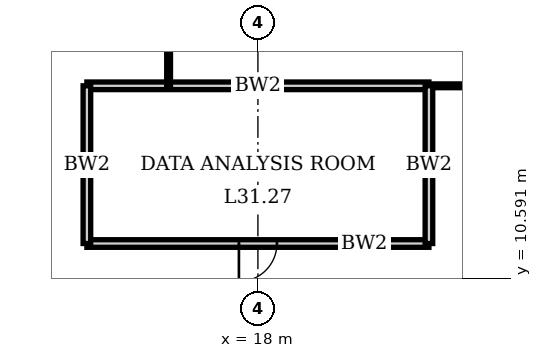
"""IFC4 building model, lengths in metres.
Left out: names, types, materials, properties, quantities, classifications, styles, units other than length and angle.
Written with IfcOpenShell. Run it as: python <this file> out.ifc"""

import sys

from ifc_helpers import new_model, si_unit, direction, frame, frame_2d, origin, place, context, subcontext, project, spatial, rectangle, extrude, element, fill, save


model = new_model("IFC4")
c1 = context("Model", 3, precision=1e-05, world=origin(), true_north=direction((0.0, 1.0)))
c2 = subcontext(c1, "Body", "Model", "MODEL_VIEW")
j1 = project(units=[si_unit("LENGTHUNIT", "METRE"), si_unit("PLANEANGLEUNIT", "RADIAN")], contexts=[c1])
p1 = place(None, origin())
s1 = spatial("IfcSite", under=j1, at=p1, CompositionType="ELEMENT")
p2 = place(p1, origin())
s2 = spatial("IfcBuilding", under=s1, at=p2, CompositionType="ELEMENT")
p3 = place(p2, frame((0.0, 0.0, 129.0)))
s3 = spatial("IfcBuildingStorey", under=s2, at=p3, CompositionType="ELEMENT", Elevation=129.0)
p4 = place(p3, frame((13.5, 11.5, 0.0), z_axis=(0.0, 0.0, 1.0), x_axis=(1.0, 0.0, 0.0)))
e1 = element("IfcWall", 1, at=p4, inside=s3, PredefinedType="SOLIDWALL", context=c2, shape_type="SweptSolid", body=[
    extrude(rectangle(XDim=9.0, YDim=0.2, at=frame_2d((4.5, 0.0))), origin(), (0.0, 0.0, 1.0), 3.75),
])
p5 = place(p4, frame((4.0, 0.0, 0.0)))
e2 = element("IfcOpeningElement", 2, at=p5, cuts=e1, PredefinedType="OPENING", context=c2, shape_type="SweptSolid", body=[
    extrude(rectangle(XDim=1.0, YDim=2.4, at=frame_2d((0.5, 1.2))), frame((0.0, 0.11, 0.0), z_axis=(0.0, -1.0, 0.0), x_axis=(1.0, 0.0, 0.0)), (0.0, 0.0, 1.0), 0.22),
])
p6 = place(p3, frame((13.5, 15.65, 0.0), z_axis=(0.0, 0.0, 1.0), x_axis=(1.0, 0.0, 0.0)))
e3 = element("IfcWall", 3, at=p6, inside=s3, PredefinedType="SOLIDWALL", context=c2, shape_type="SweptSolid", body=[
    extrude(rectangle(XDim=9.0, YDim=0.2, at=frame_2d((4.5, 0.0))), origin(), (0.0, 0.0, 1.0), 3.75),
])
p7 = place(p3, frame((22.5, 15.65, 0.0), z_axis=(0.0, 0.0, 1.0), x_axis=(1.0, 0.0, 0.0)))
e4 = element("IfcWall", 4, at=p7, inside=s3, PredefinedType="PARTITIONING", context=c2, shape_type="SweptSolid", body=[
    extrude(rectangle(XDim=13.5, YDim=0.1, at=frame_2d((6.75, 0.0))), origin(), (0.0, 0.0, 1.0), 3.75),
])
p8 = place(p7, frame((6.25, 0.0, 0.0)))
e5 = element("IfcOpeningElement", 5, at=p8, cuts=e4, PredefinedType="OPENING", context=c2, shape_type="SweptSolid", body=[
    extrude(rectangle(XDim=1.0, YDim=2.4, at=frame_2d((0.5, 1.2))), frame((0.0, 0.06, 0.0), z_axis=(0.0, -1.0, 0.0), x_axis=(1.0, 0.0, 0.0)), (0.0, 0.0, 1.0), 0.12),
])
p9 = place(p3, frame((13.5, 11.5, 0.0), z_axis=(0.0, 0.0, 1.0), x_axis=(0.0, 1.0, 0.0)))
e6 = element("IfcWall", 6, at=p9, inside=s3, PredefinedType="SOLIDWALL", context=c2, shape_type="SweptSolid", body=[
    extrude(rectangle(XDim=4.15, YDim=0.2, at=frame_2d((2.075, 0.0))), origin(), (0.0, 0.0, 1.0), 3.75),
])
p10 = place(p3, frame((15.65, 15.65, 0.0), z_axis=(0.0, 0.0, 1.0), x_axis=(0.0, 1.0, 0.0)))
e7 = element("IfcWall", 7, at=p10, inside=s3, PredefinedType="PARTITIONING", context=c2, shape_type="SweptSolid", body=[
    extrude(rectangle(XDim=20.9, YDim=0.1, at=frame_2d((10.45, 0.0))), origin(), (0.0, 0.0, 1.0), 3.75),
])
p11 = place(p10, frame((9.95, 0.0, 0.0)))
e8 = element("IfcOpeningElement", 8, at=p11, cuts=e7, PredefinedType="OPENING", context=c2, shape_type="SweptSolid", body=[
    extrude(rectangle(XDim=1.0, YDim=2.4, at=frame_2d((0.5, 1.2))), frame((0.0, 0.06, 0.0), z_axis=(0.0, -1.0, 0.0), x_axis=(1.0, 0.0, 0.0)), (0.0, 0.0, 1.0), 0.12),
])
p12 = place(p3, frame((22.5, 11.5, 0.0), z_axis=(0.0, 0.0, 1.0), x_axis=(0.0, 1.0, 0.0)))
e9 = element("IfcWall", 9, at=p12, inside=s3, PredefinedType="SOLIDWALL", context=c2, shape_type="SweptSolid", body=[
    extrude(rectangle(XDim=4.15, YDim=0.2, at=frame_2d((2.075, 0.0))), origin(), (0.0, 0.0, 1.0), 3.75),
])
p13 = place(p5, origin())
e10 = element("IfcDoor", 10, at=p13, inside=s3, OperationType="SINGLE_SWING_LEFT", PredefinedType="DOOR", context=c2, shape_type="SweptSolid", body=[
    extrude(rectangle(XDim=1.0, YDim=2.4, at=frame_2d((0.5, 1.2))), frame((0.0, 0.035, 0.0), z_axis=(0.0, -1.0, 0.0), x_axis=(1.0, 0.0, 0.0)), (0.0, 0.0, 1.0), 0.07),
])
fill(e2, e10)
save(model, sys.argv[1])
